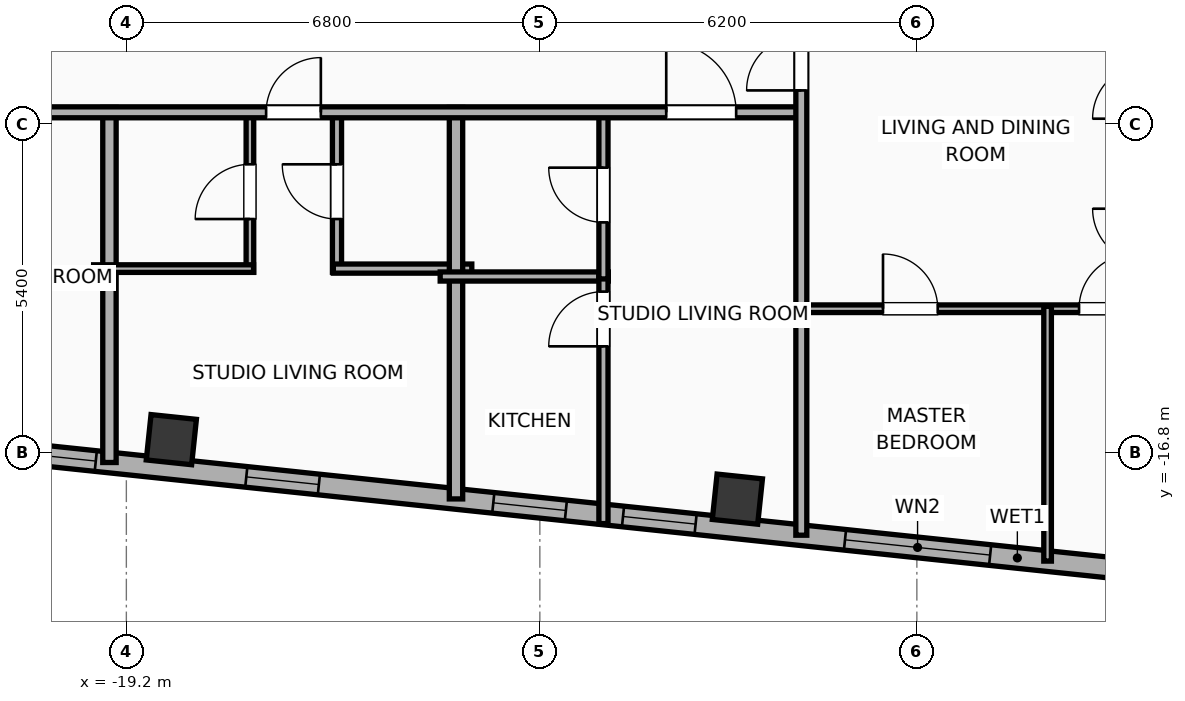
"""IFC4 building model, lengths in metres.
Left out: names, types, materials, properties, quantities, classifications, styles, units other than length and angle.
Written with IfcOpenShell. Run it as: python <this file> out.ifc"""

import sys

from ifc_helpers import new_model, si_unit, direction, frame, frame_2d, origin, origin_2d, place, context, subcontext, project, spatial, rectangle, hollow_rectangle, extrude, element, fill, save


model = new_model("IFC4")
c1 = context("Model", 3, precision=1e-05, world=origin(), true_north=direction((0.0, 1.0)))
c2 = subcontext(c1, "Body", "Model", "MODEL_VIEW")
j1 = project(units=[si_unit("LENGTHUNIT", "METRE"), si_unit("PLANEANGLEUNIT", "RADIAN")], contexts=[c1])
p1 = place(None, origin())
s1 = spatial("IfcSite", under=j1, at=p1, CompositionType="ELEMENT")
p2 = place(p1, origin())
s2 = spatial("IfcBuilding", under=s1, at=p2, CompositionType="ELEMENT")
p3 = place(p2, frame((0.0, 0.0, 287.3)))
s3 = spatial("IfcBuildingStorey", under=s2, at=p3, CompositionType="ELEMENT", Elevation=287.3)
for number, where, z_axis, x_axis in (
    (1, (-18.46, -16.583, 0.0), (0.0, 0.0, 1.0), (0.995, -0.105, 0.0)),
    (2, (-9.152, -17.561, 0.0), (0.0, 0.0, 1.0), (0.995, -0.105, 0.0)),
):
    element("IfcColumn", number, at=place(p3, frame(where, z_axis=z_axis, x_axis=x_axis)), inside=s3, PredefinedType="COLUMN", context=c2, shape_type="SweptSolid", body=[
        extrude(hollow_rectangle(XDim=0.75, YDim=0.75, WallThickness=0.025, at=origin_2d()), origin(), (0.0, 0.0, 1.0), 3.9),
    ])
p4 = place(p3, frame((18.708, -20.972, 0.0), z_axis=(0.0, 0.0, 1.0), x_axis=(-0.994521888554, 0.104528528102, 0.0)))
e3 = element("IfcWall", 3, at=p4, inside=s3, PredefinedType="ELEMENTEDWALL", context=c2, shape_type="SweptSolid", body=[
    extrude(rectangle(XDim=46.766, YDim=0.34, at=frame_2d((23.383, 0.0))), origin(), (0.0, 0.0, 1.0), 3.635),
])
p5 = place(p4, frame((23.833, 0.0, 0.75)))
e4 = element("IfcOpeningElement", 4, at=p5, cuts=e3, PredefinedType="OPENING", context=c2, shape_type="SweptSolid", body=[
    extrude(rectangle(XDim=2.4, YDim=2.1, at=frame_2d((1.2, 1.05))), frame((0.0, 0.18, 0.0), z_axis=(0.0, -1.0, 0.0), x_axis=(1.0, 0.0, 0.0)), (0.0, 0.0, 1.0), 0.36),
])
p6 = place(p4, frame((38.622, 0.0, 0.75)))
e5 = element("IfcOpeningElement", 5, at=p6, cuts=e3, PredefinedType="OPENING", context=c2, shape_type="SweptSolid", body=[
    extrude(rectangle(XDim=2.4, YDim=2.1, at=frame_2d((1.2, 1.05))), frame((0.0, 0.18, 0.0), z_axis=(0.0, -1.0, 0.0), x_axis=(1.0, 0.0, 0.0)), (0.0, 0.0, 1.0), 0.36),
])
p7 = place(p4, frame((44.402, 0.0, 0.75)))
e6 = element("IfcOpeningElement", 6, at=p7, cuts=e3, PredefinedType="OPENING", context=c2, shape_type="SweptSolid", body=[
    extrude(rectangle(XDim=1.2, YDim=2.05, at=frame_2d((0.6, 1.025))), frame((0.0, 0.18, 0.0), z_axis=(0.0, -1.0, 0.0), x_axis=(1.0, 0.0, 0.0)), (0.0, 0.0, 1.0), 0.36),
])
p8 = place(p4, frame((42.358, 0.0, 0.75)))
e7 = element("IfcOpeningElement", 7, at=p8, cuts=e3, PredefinedType="OPENING", context=c2, shape_type="SweptSolid", body=[
    extrude(rectangle(XDim=1.2, YDim=2.05, at=frame_2d((0.6, 1.025))), frame((0.0, 0.18, 0.0), z_axis=(0.0, -1.0, 0.0), x_axis=(1.0, 0.0, 0.0)), (0.0, 0.0, 1.0), 0.36),
])
p9 = place(p4, frame((34.933, 0.0, 0.75)))
e8 = element("IfcOpeningElement", 8, at=p9, cuts=e3, PredefinedType="OPENING", context=c2, shape_type="SweptSolid", body=[
    extrude(rectangle(XDim=1.2, YDim=2.05, at=frame_2d((0.6, 1.025))), frame((0.0, 0.18, 0.0), z_axis=(0.0, -1.0, 0.0), x_axis=(1.0, 0.0, 0.0)), (0.0, 0.0, 1.0), 0.36),
])
p10 = place(p4, frame((28.704, 0.0, 0.75)))
e9 = element("IfcOpeningElement", 9, at=p10, cuts=e3, PredefinedType="OPENING", context=c2, shape_type="SweptSolid", body=[
    extrude(rectangle(XDim=1.2, YDim=2.05, at=frame_2d((0.6, 1.025))), frame((0.0, 0.18, 0.0), z_axis=(0.0, -1.0, 0.0), x_axis=(1.0, 0.0, 0.0)), (0.0, 0.0, 1.0), 0.36),
])
p11 = place(p4, frame((30.849, 0.0, 0.75)))
e10 = element("IfcOpeningElement", 10, at=p11, cuts=e3, PredefinedType="OPENING", context=c2, shape_type="SweptSolid", body=[
    extrude(rectangle(XDim=1.2, YDim=2.05, at=frame_2d((0.6, 1.025))), frame((0.0, 0.18, 0.0), z_axis=(0.0, -1.0, 0.0), x_axis=(1.0, 0.0, 0.0)), (0.0, 0.0, 1.0), 0.36),
])
p12 = place(p4, frame((7.479, 0.0, 0.75)))
e11 = element("IfcOpeningElement", 11, at=p12, cuts=e3, PredefinedType="OPENING", context=c2, shape_type="SweptSolid", body=[
    extrude(rectangle(XDim=1.2, YDim=2.05, at=frame_2d((0.6, 1.025))), frame((0.0, 0.18, 0.0), z_axis=(0.0, -1.0, 0.0), x_axis=(1.0, 0.0, 0.0)), (0.0, 0.0, 1.0), 0.36),
])
p13 = place(p4, frame((3.796, 0.0, 0.75)))
e12 = element("IfcOpeningElement", 12, at=p13, cuts=e3, PredefinedType="OPENING", context=c2, shape_type="SweptSolid", body=[
    extrude(rectangle(XDim=1.2, YDim=2.05, at=frame_2d((0.6, 1.025))), frame((0.0, 0.18, 0.0), z_axis=(0.0, -1.0, 0.0), x_axis=(1.0, 0.0, 0.0)), (0.0, 0.0, 1.0), 0.36),
])
p14 = place(p4, frame((1.388, 0.0, 0.75)))
e13 = element("IfcOpeningElement", 13, at=p14, cuts=e3, PredefinedType="OPENING", context=c2, shape_type="SweptSolid", body=[
    extrude(rectangle(XDim=1.2, YDim=2.05, at=frame_2d((0.6, 1.025))), frame((0.0, 0.18, 0.0), z_axis=(0.0, -1.0, 0.0), x_axis=(1.0, 0.0, 0.0)), (0.0, 0.0, 1.0), 0.36),
])
p15 = place(p4, frame((20.254, 0.0, 0.75)))
e14 = element("IfcOpeningElement", 14, at=p15, cuts=e3, PredefinedType="OPENING", context=c2, shape_type="SweptSolid", body=[
    extrude(rectangle(XDim=1.2, YDim=2.05, at=frame_2d((0.6, 1.025))), frame((0.0, 0.18, 0.0), z_axis=(0.0, -1.0, 0.0), x_axis=(1.0, 0.0, 0.0)), (0.0, 0.0, 1.0), 0.36),
])
p16 = place(p4, frame((16.172, 0.0, 0.75)))
e15 = element("IfcOpeningElement", 15, at=p16, cuts=e3, PredefinedType="OPENING", context=c2, shape_type="SweptSolid", body=[
    extrude(rectangle(XDim=1.2, YDim=2.05, at=frame_2d((0.6, 1.025))), frame((0.0, 0.18, 0.0), z_axis=(0.0, -1.0, 0.0), x_axis=(1.0, 0.0, 0.0)), (0.0, 0.0, 1.0), 0.36),
])
p17 = place(p4, frame((12.11, 0.0, 0.75)))
e16 = element("IfcOpeningElement", 16, at=p17, cuts=e3, PredefinedType="OPENING", context=c2, shape_type="SweptSolid", body=[
    extrude(rectangle(XDim=1.2, YDim=2.05, at=frame_2d((0.6, 1.025))), frame((0.0, 0.18, 0.0), z_axis=(0.0, -1.0, 0.0), x_axis=(1.0, 0.0, 0.0)), (0.0, 0.0, 1.0), 0.36),
])
p18 = place(p3, frame((-19.478, -16.959, 0.0), z_axis=(0.0, 0.0, 1.0), x_axis=(0.0, 1.0, 0.0)))
e17 = element("IfcWall", 17, at=p18, inside=s3, PredefinedType="PARTITIONING", context=c2, shape_type="SweptSolid", body=[
    extrude(rectangle(XDim=5.839, YDim=0.22, at=frame_2d((2.919, 0.0))), origin(), (0.0, 0.0, 1.0), 3.635),
])
p19 = place(p3, frame((-17.168, -13.83, 0.0), z_axis=(0.0, 0.0, 1.0), x_axis=(0.0, 1.0, 0.0)))
e18 = element("IfcWall", 18, at=p19, inside=s3, PredefinedType="PARTITIONING", context=c2, shape_type="SweptSolid", body=[
    extrude(rectangle(XDim=2.65, YDim=0.125, at=frame_2d((1.325, 0.0))), origin(), (0.0, 0.0, 1.0), 3.635),
])
p20 = place(p19, frame((0.875, 0.0, 0.0)))
e19 = element("IfcOpeningElement", 19, at=p20, cuts=e18, PredefinedType="OPENING", context=c2, shape_type="SweptSolid", body=[
    extrude(rectangle(XDim=0.9, YDim=2.05, at=frame_2d((0.45, 1.025))), frame((0.0, 0.073, 0.0), z_axis=(0.0, -1.0, 0.0), x_axis=(1.0, 0.0, 0.0)), (0.0, 0.0, 1.0), 0.145),
])
p21 = place(p3, frame((-15.736, -13.83, 0.0), z_axis=(0.0, 0.0, 1.0), x_axis=(0.0, 1.0, 0.0)))
e20 = element("IfcWall", 20, at=p21, inside=s3, PredefinedType="PLUMBINGWALL", context=c2, shape_type="SweptSolid", body=[
    extrude(rectangle(XDim=2.65, YDim=0.15, at=frame_2d((1.325, 0.0))), origin(), (0.0, 0.0, 1.0), 3.635),
])
p22 = place(p21, frame((0.875, 0.0, 0.0)))
e21 = element("IfcOpeningElement", 21, at=p22, cuts=e20, PredefinedType="OPENING", context=c2, shape_type="SweptSolid", body=[
    extrude(rectangle(XDim=0.9, YDim=2.05, at=frame_2d((0.45, 1.025))), frame((0.0, 0.085, 0.0), z_axis=(0.0, -1.0, 0.0), x_axis=(1.0, 0.0, 0.0)), (0.0, 0.0, 1.0), 0.17),
])
p23 = place(p3, frame((-19.738, -13.77, 0.0), z_axis=(0.0, 0.0, 1.0), x_axis=(1.0, 0.0, 0.0)))
e22 = element("IfcWall", 22, at=p23, inside=s3, PredefinedType="PARTITIONING", context=c2, shape_type="SweptSolid", body=[
    extrude(rectangle(XDim=2.63, YDim=0.125, at=frame_2d((1.315, 0.0))), origin(), (0.0, 0.0, 1.0), 3.635),
])
p24 = place(p3, frame((-15.796, -13.77, 0.0), z_axis=(0.0, 0.0, 1.0), x_axis=(1.0, 0.0, 0.0)))
e23 = element("IfcWall", 23, at=p24, inside=s3, PredefinedType="PLUMBINGWALL", context=c2, shape_type="SweptSolid", body=[
    extrude(rectangle(XDim=2.277, YDim=0.15, at=frame_2d((1.138, 0.0))), origin(), (0.0, 0.0, 1.0), 3.635),
])
p25 = place(p3, frame((-13.779, -17.558, 0.0), z_axis=(0.0, 0.0, 1.0), x_axis=(0.0, 1.0, 0.0)))
e24 = element("IfcWall", 24, at=p25, inside=s3, PredefinedType="PARTITIONING", context=c2, shape_type="SweptSolid", body=[
    extrude(rectangle(XDim=6.438, YDim=0.22, at=frame_2d((3.219, 0.0))), origin(), (0.0, 0.0, 1.0), 3.635),
])
p26 = place(p3, frame((-14.039, -13.9, 0.0), z_axis=(0.0, 0.0, 1.0), x_axis=(1.0, 0.0, 0.0)))
e25 = element("IfcWall", 25, at=p26, inside=s3, PredefinedType="PLUMBINGWALL", context=c2, shape_type="SweptSolid", body=[
    extrude(rectangle(XDim=2.765, YDim=0.15, at=frame_2d((1.383, 0.0))), origin(), (0.0, 0.0, 1.0), 3.635),
])
p27 = place(p3, frame((-11.354, -17.963, 0.0), z_axis=(0.0, 0.0, 1.0), x_axis=(0.0, 1.0, 0.0)))
e26 = element("IfcWall", 26, at=p27, inside=s3, PredefinedType="PLUMBINGWALL", context=c2, shape_type="SweptSolid", body=[
    extrude(rectangle(XDim=4.103, YDim=0.15, at=frame_2d((2.052, 0.0))), origin(), (0.0, 0.0, 1.0), 3.635),
])
p28 = place(p27, frame((2.915, 0.0, 0.0)))
e27 = element("IfcOpeningElement", 27, at=p28, cuts=e26, PredefinedType="OPENING", context=c2, shape_type="SweptSolid", body=[
    extrude(rectangle(XDim=0.9, YDim=2.05, at=frame_2d((0.45, 1.025))), frame((0.0, 0.085, 0.0), z_axis=(0.0, -1.0, 0.0), x_axis=(1.0, 0.0, 0.0)), (0.0, 0.0, 1.0), 0.17),
])
p29 = place(p3, frame((-11.354, -13.94, 0.0), z_axis=(0.0, 0.0, 1.0), x_axis=(0.0, 1.0, 0.0)))
e28 = element("IfcWall", 28, at=p29, inside=s3, PredefinedType="PLUMBINGWALL", context=c2, shape_type="SweptSolid", body=[
    extrude(rectangle(XDim=2.76, YDim=0.15, at=frame_2d((1.38, 0.0))), origin(), (0.0, 0.0, 1.0), 3.635),
])
p30 = place(p29, frame((0.93, 0.0, 0.0)))
e29 = element("IfcOpeningElement", 29, at=p30, cuts=e28, PredefinedType="OPENING", context=c2, shape_type="SweptSolid", body=[
    extrude(rectangle(XDim=0.9, YDim=2.05, at=frame_2d((0.45, 1.025))), frame((0.0, 0.085, 0.0), z_axis=(0.0, -1.0, 0.0), x_axis=(1.0, 0.0, 0.0)), (0.0, 0.0, 1.0), 0.17),
])
p31 = place(p3, frame((-30.755, -11.2, 0.0), z_axis=(0.0, 0.0, 1.0), x_axis=(1.0, 0.0, 0.0)))
e30 = element("IfcWall", 30, at=p31, inside=s3, PredefinedType="PARTITIONING", context=c2, shape_type="SweptSolid", body=[
    extrude(rectangle(XDim=22.675, YDim=0.18, at=frame_2d((11.337, 0.0))), origin(), (0.0, 0.0, 1.0), 3.635),
])
p32 = place(p31, frame((2.414, 0.0, 0.0)))
e31 = element("IfcOpeningElement", 31, at=p32, cuts=e30, PredefinedType="OPENING", context=c2, shape_type="SweptSolid", body=[
    extrude(rectangle(XDim=0.9, YDim=2.05, at=frame_2d((0.45, 1.025))), frame((0.0, 0.1, 0.0), z_axis=(0.0, -1.0, 0.0), x_axis=(1.0, 0.0, 0.0)), (0.0, 0.0, 1.0), 0.2),
])
p33 = place(p31, frame((8.987, 0.0, 0.0)))
e32 = element("IfcOpeningElement", 32, at=p33, cuts=e30, PredefinedType="OPENING", context=c2, shape_type="SweptSolid", body=[
    extrude(rectangle(XDim=1.15, YDim=2.05, at=frame_2d((0.575, 1.025))), frame((0.0, 0.1, 0.0), z_axis=(0.0, -1.0, 0.0), x_axis=(1.0, 0.0, 0.0)), (0.0, 0.0, 1.0), 0.2),
])
p34 = place(p31, frame((13.854, 0.0, 0.0)))
e33 = element("IfcOpeningElement", 33, at=p34, cuts=e30, PredefinedType="OPENING", context=c2, shape_type="SweptSolid", body=[
    extrude(rectangle(XDim=0.9, YDim=2.05, at=frame_2d((0.45, 1.025))), frame((0.0, 0.1, 0.0), z_axis=(0.0, -1.0, 0.0), x_axis=(1.0, 0.0, 0.0)), (0.0, 0.0, 1.0), 0.2),
])
p35 = place(p31, frame((20.433, 0.0, 0.0)))
e34 = element("IfcOpeningElement", 34, at=p35, cuts=e30, PredefinedType="OPENING", context=c2, shape_type="SweptSolid", body=[
    extrude(rectangle(XDim=1.15, YDim=2.05, at=frame_2d((0.575, 1.025))), frame((0.0, 0.1, 0.0), z_axis=(0.0, -1.0, 0.0), x_axis=(1.0, 0.0, 0.0)), (0.0, 0.0, 1.0), 0.2),
])
p36 = place(p3, frame((-8.08, -14.43, 0.0), z_axis=(0.0, 0.0, 1.0), x_axis=(1.0, 0.0, 0.0)))
e35 = element("IfcWall", 35, at=p36, inside=s3, PredefinedType="PARTITIONING", context=c2, shape_type="SweptSolid", body=[
    extrude(rectangle(XDim=8.06, YDim=0.125, at=frame_2d((4.03, 0.0))), origin(), (0.0, 0.0, 1.0), 3.635),
])
p37 = place(p36, frame((1.323, 0.0, 0.0)))
e36 = element("IfcOpeningElement", 36, at=p37, cuts=e35, PredefinedType="OPENING", context=c2, shape_type="SweptSolid", body=[
    extrude(rectangle(XDim=0.9, YDim=2.05, at=frame_2d((0.45, 1.025))), frame((0.0, 0.073, 0.0), z_axis=(0.0, -1.0, 0.0), x_axis=(1.0, 0.0, 0.0)), (0.0, 0.0, 1.0), 0.145),
])
p38 = place(p36, frame((4.547, 0.0, 0.0)))
e37 = element("IfcOpeningElement", 37, at=p38, cuts=e35, PredefinedType="OPENING", context=c2, shape_type="SweptSolid", body=[
    extrude(rectangle(XDim=0.9, YDim=2.05, at=frame_2d((0.45, 1.025))), frame((0.0, 0.073, 0.0), z_axis=(0.0, -1.0, 0.0), x_axis=(1.0, 0.0, 0.0)), (0.0, 0.0, 1.0), 0.145),
])
p39 = place(p3, frame((-4.05, -18.58, 0.0), z_axis=(0.0, 0.0, 1.0), x_axis=(0.0, 1.0, 0.0)))
e38 = element("IfcWall", 38, at=p39, inside=s3, PredefinedType="PARTITIONING", context=c2, shape_type="SweptSolid", body=[
    extrude(rectangle(XDim=4.19, YDim=0.125, at=frame_2d((2.095, 0.0))), origin(), (0.0, 0.0, 1.0), 3.635),
])
p40 = place(p3, frame((-8.1, -18.155, 0.0), z_axis=(0.0, 0.0, 1.0), x_axis=(0.0, 1.0, 0.0)))
e39 = element("IfcWall", 39, at=p40, inside=s3, PredefinedType="PARTITIONING", context=c2, shape_type="SweptSolid", body=[
    extrude(rectangle(XDim=8.564, YDim=0.18, at=frame_2d((4.282, 0.0))), origin(), (0.0, 0.0, 1.0), 3.635),
])
p41 = place(p40, frame((7.315, 0.0, 0.0)))
e40 = element("IfcOpeningElement", 40, at=p41, cuts=e39, PredefinedType="OPENING", context=c2, shape_type="SweptSolid", body=[
    extrude(rectangle(XDim=0.9, YDim=2.05, at=frame_2d((0.45, 1.025))), frame((0.0, 0.1, 0.0), z_axis=(0.0, -1.0, 0.0), x_axis=(1.0, 0.0, 0.0)), (0.0, 0.0, 1.0), 0.2),
])
p42 = place(p5, origin())
e41 = element("IfcWindow", 41, at=p42, inside=s3, PartitioningType="SINGLE_PANEL", PredefinedType="WINDOW", context=c2, shape_type="SweptSolid", body=[
    extrude(rectangle(XDim=2.4, YDim=2.1, at=frame_2d((1.2, 1.05))), frame((0.0, 0.03, 0.0), z_axis=(0.0, -1.0, 0.0), x_axis=(1.0, 0.0, 0.0)), (0.0, 0.0, 1.0), 0.06),
])
fill(e4, e41)
p43 = place(p6, origin())
e42 = element("IfcWindow", 42, at=p43, inside=s3, PartitioningType="SINGLE_PANEL", PredefinedType="WINDOW", context=c2, shape_type="SweptSolid", body=[
    extrude(rectangle(XDim=2.4, YDim=2.1, at=frame_2d((1.2, 1.05))), frame((0.0, 0.03, 0.0), z_axis=(0.0, -1.0, 0.0), x_axis=(1.0, 0.0, 0.0)), (0.0, 0.0, 1.0), 0.06),
])
fill(e5, e42)
p44 = place(p9, origin())
e43 = element("IfcWindow", 43, at=p44, inside=s3, PartitioningType="SINGLE_PANEL", PredefinedType="WINDOW", context=c2, shape_type="SweptSolid", body=[
    extrude(rectangle(XDim=1.2, YDim=2.05, at=frame_2d((0.6, 1.025))), frame((0.0, 0.03, 0.0), z_axis=(0.0, -1.0, 0.0), x_axis=(1.0, 0.0, 0.0)), (0.0, 0.0, 1.0), 0.06),
])
fill(e8, e43)
p45 = place(p10, origin())
e44 = element("IfcWindow", 44, at=p45, inside=s3, PartitioningType="SINGLE_PANEL", PredefinedType="WINDOW", context=c2, shape_type="SweptSolid", body=[
    extrude(rectangle(XDim=1.2, YDim=2.05, at=frame_2d((0.6, 1.025))), frame((0.0, 0.03, 0.0), z_axis=(0.0, -1.0, 0.0), x_axis=(1.0, 0.0, 0.0)), (0.0, 0.0, 1.0), 0.06),
])
fill(e9, e44)
p46 = place(p11, origin())
e45 = element("IfcWindow", 45, at=p46, inside=s3, PartitioningType="SINGLE_PANEL", PredefinedType="WINDOW", context=c2, shape_type="SweptSolid", body=[
    extrude(rectangle(XDim=1.2, YDim=2.05, at=frame_2d((0.6, 1.025))), frame((0.0, 0.03, 0.0), z_axis=(0.0, -1.0, 0.0), x_axis=(1.0, 0.0, 0.0)), (0.0, 0.0, 1.0), 0.06),
])
fill(e10, e45)
p47 = place(p20, origin())
e46 = element("IfcDoor", 46, at=p47, inside=s3, OperationType="SINGLE_SWING_LEFT", PredefinedType="DOOR", context=c2, shape_type="SweptSolid", body=[
    extrude(rectangle(XDim=0.9, YDim=2.05, at=frame_2d((0.45, 1.025))), frame((0.0, 0.025, 0.0), z_axis=(0.0, -1.0, 0.0), x_axis=(1.0, 0.0, 0.0)), (0.0, 0.0, 1.0), 0.05),
])
fill(e19, e46)
p48 = place(p22, origin())
e47 = element("IfcDoor", 47, at=p48, inside=s3, OperationType="SINGLE_SWING_RIGHT", PredefinedType="DOOR", context=c2, shape_type="SweptSolid", body=[
    extrude(rectangle(XDim=0.9, YDim=2.05, at=frame_2d((0.45, 1.025))), frame((0.0, 0.025, 0.0), z_axis=(0.0, -1.0, 0.0), x_axis=(1.0, 0.0, 0.0)), (0.0, 0.0, 1.0), 0.05),
])
fill(e21, e47)
p49 = place(p28, origin())
e48 = element("IfcDoor", 48, at=p49, inside=s3, OperationType="SINGLE_SWING_LEFT", PredefinedType="DOOR", context=c2, shape_type="SweptSolid", body=[
    extrude(rectangle(XDim=0.9, YDim=2.05, at=frame_2d((0.45, 1.025))), frame((0.0, 0.025, 0.0), z_axis=(0.0, -1.0, 0.0), x_axis=(1.0, 0.0, 0.0)), (0.0, 0.0, 1.0), 0.05),
])
fill(e27, e48)
p50 = place(p30, origin())
e49 = element("IfcDoor", 49, at=p50, inside=s3, OperationType="SINGLE_SWING_RIGHT", PredefinedType="DOOR", context=c2, shape_type="SweptSolid", body=[
    extrude(rectangle(XDim=0.9, YDim=2.05, at=frame_2d((0.45, 1.025))), frame((0.0, 0.025, 0.0), z_axis=(0.0, -1.0, 0.0), x_axis=(1.0, 0.0, 0.0)), (0.0, 0.0, 1.0), 0.05),
])
fill(e29, e49)
p51 = place(p34, origin())
e50 = element("IfcDoor", 50, at=p51, inside=s3, OperationType="SINGLE_SWING_RIGHT", PredefinedType="DOOR", context=c2, shape_type="SweptSolid", body=[
    extrude(rectangle(XDim=0.9, YDim=2.05, at=frame_2d((0.45, 1.025))), frame((0.0, 0.025, 0.0), z_axis=(0.0, -1.0, 0.0), x_axis=(1.0, 0.0, 0.0)), (0.0, 0.0, 1.0), 0.05),
])
fill(e33, e50)
p52 = place(p35, origin())
e51 = element("IfcDoor", 51, at=p52, inside=s3, OperationType="SINGLE_SWING_LEFT", PredefinedType="DOOR", context=c2, shape_type="SweptSolid", body=[
    extrude(rectangle(XDim=1.15, YDim=2.05, at=frame_2d((0.575, 1.025))), frame((0.0, 0.025, 0.0), z_axis=(0.0, -1.0, 0.0), x_axis=(1.0, 0.0, 0.0)), (0.0, 0.0, 1.0), 0.05),
])
fill(e34, e51)
p53 = place(p37, origin())
e52 = element("IfcDoor", 52, at=p53, inside=s3, OperationType="SINGLE_SWING_LEFT", PredefinedType="DOOR", context=c2, shape_type="SweptSolid", body=[
    extrude(rectangle(XDim=0.9, YDim=2.05, at=frame_2d((0.45, 1.025))), frame((0.0, 0.025, 0.0), z_axis=(0.0, -1.0, 0.0), x_axis=(1.0, 0.0, 0.0)), (0.0, 0.0, 1.0), 0.05),
])
fill(e36, e52)
p54 = place(p38, origin())
e53 = element("IfcDoor", 53, at=p54, inside=s3, OperationType="SINGLE_SWING_RIGHT", PredefinedType="DOOR", context=c2, shape_type="SweptSolid", body=[
    extrude(rectangle(XDim=0.9, YDim=2.05, at=frame_2d((0.45, 1.025))), frame((0.0, 0.025, 0.0), z_axis=(0.0, -1.0, 0.0), x_axis=(1.0, 0.0, 0.0)), (0.0, 0.0, 1.0), 0.05),
])
fill(e37, e53)
p55 = place(p41, origin())
e54 = element("IfcDoor", 54, at=p55, inside=s3, OperationType="SINGLE_SWING_LEFT", PredefinedType="DOOR", context=c2, shape_type="SweptSolid", body=[
    extrude(rectangle(XDim=0.9, YDim=2.05, at=frame_2d((0.45, 1.025))), frame((0.0, 0.025, 0.0), z_axis=(0.0, -1.0, 0.0), x_axis=(1.0, 0.0, 0.0)), (0.0, 0.0, 1.0), 0.05),
])
fill(e40, e54)
save(model, sys.argv[1])
